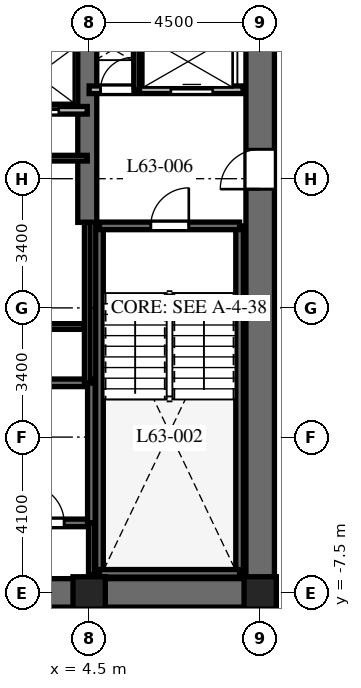
"""IFC4 building model, lengths in metres.
Left out: names, types, materials, properties, quantities, classifications, styles, units other than length and angle.
Written with IfcOpenShell. Run it as: python <this file> out.ifc"""

import sys

from ifc_helpers import new_model, si_unit, direction, frame, frame_2d, origin, origin_2d, place, context, subcontext, project, spatial, rectangle, extrude, element, fill, save


model = new_model("IFC4")
c1 = context("Model", 3, precision=1e-05, world=origin(), true_north=direction((0.0, 1.0)))
c2 = subcontext(c1, "Body", "Model", "MODEL_VIEW")
j1 = project(units=[si_unit("LENGTHUNIT", "METRE"), si_unit("PLANEANGLEUNIT", "RADIAN")], contexts=[c1])
p1 = place(None, origin())
s1 = spatial("IfcSite", under=j1, at=p1, CompositionType="ELEMENT")
p2 = place(p1, origin())
s2 = spatial("IfcBuilding", under=s1, at=p2, CompositionType="ELEMENT")
p3 = place(p2, frame((0.0, 0.0, 252.1)))
s3 = spatial("IfcBuildingStorey", under=s2, at=p3, CompositionType="ELEMENT", Elevation=252.1)
p4 = place(p3, frame((-9.375, -7.5, 0.0), z_axis=(0.0, 0.0, 1.0), x_axis=(1.0, 0.0, 0.0)))
e1 = element("IfcWall", 1, at=p4, inside=s3, PredefinedType="SHEAR", context=c2, shape_type="SweptSolid", body=[
    extrude(rectangle(XDim=18.75, YDim=0.75, at=frame_2d((9.375, 0.0))), origin(), (0.0, 0.0, 1.0), 3.8),
])
p5 = place(p4, frame((9.425, 0.0, 0.0)))
e2 = element("IfcOpeningElement", 2, at=p5, cuts=e1, PredefinedType="OPENING", context=c2, shape_type="SweptSolid", body=[
    extrude(rectangle(XDim=1.0, YDim=2.15, at=frame_2d((0.5, 1.075))), frame((0.0, 0.385, 0.0), z_axis=(0.0, -1.0, 0.0), x_axis=(1.0, 0.0, 0.0)), (0.0, 0.0, 1.0), 0.77),
])
p6 = place(p3, frame((9.0, -7.125, 0.0), z_axis=(0.0, 0.0, 1.0), x_axis=(0.0, 1.0, 0.0)))
e3 = element("IfcWall", 3, at=p6, inside=s3, PredefinedType="SHEAR", context=c2, shape_type="SweptSolid", body=[
    extrude(rectangle(XDim=14.25, YDim=0.75, at=frame_2d((7.125, 0.0))), origin(), (0.0, 0.0, 1.0), 3.8),
])
p7 = place(p6, frame((10.25, 0.0, 0.0)))
e4 = element("IfcOpeningElement", 4, at=p7, cuts=e3, PredefinedType="OPENING", context=c2, shape_type="SweptSolid", body=[
    extrude(rectangle(XDim=1.05, YDim=2.15, at=frame_2d((0.525, 1.075))), frame((0.0, 0.385, 0.0), z_axis=(0.0, -1.0, 0.0), x_axis=(1.0, 0.0, 0.0)), (0.0, 0.0, 1.0), 0.77),
])
p8 = place(p3, frame((4.45, 2.25, 0.0), z_axis=(0.0, 0.0, 1.0), x_axis=(0.0, 1.0, 0.0)))
e5 = element("IfcWall", 5, at=p8, inside=s3, PredefinedType="SHEAR", context=c2, shape_type="SweptSolid", body=[
    extrude(rectangle(XDim=4.875, YDim=0.5, at=frame_2d((2.438, 0.0))), origin(), (0.0, 0.0, 1.0), 3.8),
])
for number, where, z_axis, x_axis in (
    (6, (4.772, -6.985, 0.0), (0.0, 0.0, 1.0), (0.0, 1.0, 0.0)),
    (7, (8.458, -6.985, 0.0), (0.0, 0.0, 1.0), (0.0, 1.0, 0.0)),
):
    element("IfcWall", number, at=place(p3, frame(where, z_axis=z_axis, x_axis=x_axis)), inside=s3, PredefinedType="SHEAR", context=c2, shape_type="SweptSolid", body=[
        extrude(rectangle(XDim=9.143, YDim=0.2, at=frame_2d((4.572, 0.0))), origin(), (0.0, 0.0, 1.0), 3.8),
    ])
p9 = place(p3, frame((4.772, -6.985, 0.0), z_axis=(0.0, 0.0, 1.0), x_axis=(1.0, 0.0, 0.0)))
e8 = element("IfcWall", 8, at=p9, inside=s3, PredefinedType="SHEAR", context=c2, shape_type="SweptSolid", body=[
    extrude(rectangle(XDim=3.686, YDim=0.2, at=frame_2d((1.843, 0.0))), origin(), (0.0, 0.0, 1.0), 3.8),
])
p10 = place(p3, frame((4.772, 2.158, 0.0), z_axis=(0.0, 0.0, 1.0), x_axis=(1.0, 0.0, 0.0)))
e9 = element("IfcWall", 9, at=p10, inside=s3, PredefinedType="SHEAR", context=c2, shape_type="SweptSolid", body=[
    extrude(rectangle(XDim=3.686, YDim=0.2, at=frame_2d((1.843, 0.0))), origin(), (0.0, 0.0, 1.0), 3.8),
])
p11 = place(p10, frame((1.35, 0.0, 0.0)))
e10 = element("IfcOpeningElement", 10, at=p11, cuts=e9, PredefinedType="OPENING", context=c2, shape_type="SweptSolid", body=[
    extrude(rectangle(XDim=1.0, YDim=2.15, at=frame_2d((0.5, 1.075))), frame((0.0, 0.11, 0.0), z_axis=(0.0, -1.0, 0.0), x_axis=(1.0, 0.0, 0.0)), (0.0, 0.0, 1.0), 0.22),
])
p12 = place(p3, frame((-4.608, -5.658, 0.0), z_axis=(0.0, 0.0, 1.0), x_axis=(1.0, 0.0, 0.0)))
e11 = element("IfcWall", 11, at=p12, inside=s3, PredefinedType="SHEAR", context=c2, shape_type="SweptSolid", body=[
    extrude(rectangle(XDim=9.166, YDim=0.2, at=frame_2d((4.583, 0.0))), origin(), (0.0, 0.0, 1.0), 3.8),
])
p13 = place(p12, frame((7.45, 0.0, 0.0)))
e12 = element("IfcOpeningElement", 12, at=p13, cuts=e11, PredefinedType="OPENING", context=c2, shape_type="SweptSolid", body=[
    extrude(rectangle(XDim=1.0, YDim=2.15, at=frame_2d((0.5, 1.075))), frame((0.0, 0.11, 0.0), z_axis=(0.0, -1.0, 0.0), x_axis=(1.0, 0.0, 0.0)), (0.0, 0.0, 1.0), 0.22),
])
p14 = place(p3, frame((-4.608, -1.972, 0.0), z_axis=(0.0, 0.0, 1.0), x_axis=(1.0, 0.0, 0.0)))
e13 = element("IfcWall", 13, at=p14, inside=s3, PredefinedType="SHEAR", context=c2, shape_type="SweptSolid", body=[
    extrude(rectangle(XDim=9.166, YDim=0.2, at=frame_2d((4.583, 0.0))), origin(), (0.0, 0.0, 1.0), 3.8),
])
p15 = place(p3, frame((4.558, -5.658, 0.0), z_axis=(0.0, 0.0, 1.0), x_axis=(0.0, 1.0, 0.0)))
e14 = element("IfcWall", 14, at=p15, inside=s3, PredefinedType="SHEAR", context=c2, shape_type="SweptSolid", body=[
    extrude(rectangle(XDim=3.686, YDim=0.2, at=frame_2d((1.843, 0.0))), origin(), (0.0, 0.0, 1.0), 3.8),
])
for number, where, z_axis, x_axis in (
    (15, (4.5, -7.5, 0.0), (0.0, 0.0, 1.0), (1.0, 0.0, 0.0)),
    (16, (9.0, -7.5, 0.0), (0.0, 0.0, 1.0), (1.0, 0.0, 0.0)),
):
    element("IfcColumn", number, at=place(p3, frame(where, z_axis=z_axis, x_axis=x_axis)), inside=s3, PredefinedType="COLUMN", context=c2, shape_type="SweptSolid", body=[
        extrude(rectangle(XDim=0.85, YDim=0.85, at=origin_2d()), origin(), (0.0, 0.0, 1.0), 3.8),
    ])
p16 = place(p3, frame((4.558, -7.02, 0.0), z_axis=(0.0, 0.0, 1.0), x_axis=(0.0, 1.0, 0.0)))
e17 = element("IfcWall", 17, at=p16, inside=s3, PredefinedType="PARTITIONING", context=c2, shape_type="SweptSolid", body=[
    extrude(rectangle(XDim=1.362, YDim=0.15, at=frame_2d((0.681, 0.0))), origin(), (0.0, 0.0, 1.0), 3.48),
])
p17 = place(p3, frame((4.5, 5.74, 0.0), z_axis=(0.0, 0.0, 1.0), x_axis=(1.0, 0.0, 0.0)))
e18 = element("IfcWall", 18, at=p17, inside=s3, PredefinedType="PARTITIONING", context=c2, shape_type="SweptSolid", body=[
    extrude(rectangle(XDim=4.05, YDim=0.2, at=frame_2d((2.025, 0.0))), origin(), (0.0, 0.0, 1.0), 3.48),
])
p18 = place(p17, frame((0.3, 0.0, 0.0)))
e19 = element("IfcOpeningElement", 19, at=p18, cuts=e18, PredefinedType="OPENING", context=c2, shape_type="SweptSolid", body=[
    extrude(rectangle(XDim=0.85, YDim=2.03, at=frame_2d((0.425, 1.015))), frame((0.0, 0.11, 0.0), z_axis=(0.0, -1.0, 0.0), x_axis=(1.0, 0.0, 0.0)), (0.0, 0.0, 1.0), 0.22),
])
p19 = place(p17, frame((2.15, 0.0, 0.0)))
e20 = element("IfcOpeningElement", 20, at=p19, cuts=e18, PredefinedType="OPENING", context=c2, shape_type="SweptSolid", body=[
    extrude(rectangle(XDim=1.1, YDim=2.2, at=frame_2d((0.55, 1.1))), frame((0.0, 0.11, 0.0), z_axis=(0.0, -1.0, 0.0), x_axis=(1.0, 0.0, 0.0)), (0.0, 0.0, 1.0), 0.22),
])
p20 = place(p3, frame((5.75, 5.74, 0.0), z_axis=(0.0, 0.0, 1.0), x_axis=(0.0, 1.0, 0.0)))
e21 = element("IfcWall", 21, at=p20, inside=s3, PredefinedType="PARTITIONING", context=c2, shape_type="SweptSolid", body=[
    extrude(rectangle(XDim=1.41, YDim=0.15, at=frame_2d((0.705, 0.0))), origin(), (0.0, 0.0, 1.0), 3.48),
])
p21 = place(p3, frame((1.85, 5.2, 0.0), z_axis=(0.0, 0.0, 1.0), x_axis=(1.0, 0.0, 0.0)))
e22 = element("IfcWall", 22, at=p21, inside=s3, PredefinedType="PARTITIONING", context=c2, shape_type="SweptSolid", body=[
    extrude(rectangle(XDim=2.6, YDim=0.2, at=frame_2d((1.3, 0.0))), origin(), (0.0, 0.0, 1.0), 3.48),
])
p22 = place(p21, frame((0.75, 0.0, 0.0)))
e23 = element("IfcOpeningElement", 23, at=p22, cuts=e22, PredefinedType="OPENING", context=c2, shape_type="SweptSolid", body=[
    extrude(rectangle(XDim=1.1, YDim=2.2, at=frame_2d((0.55, 1.1))), frame((0.0, 0.11, 0.0), z_axis=(0.0, -1.0, 0.0), x_axis=(1.0, 0.0, 0.0)), (0.0, 0.0, 1.0), 0.22),
])
p23 = place(p3, frame((4.45, -1.972, 0.0), z_axis=(0.0, 0.0, 1.0), x_axis=(0.0, 1.0, 0.0)))
e24 = element("IfcWall", 24, at=p23, inside=s3, PredefinedType="PARTITIONING", context=c2, shape_type="SweptSolid", body=[
    extrude(rectangle(XDim=4.222, YDim=0.15, at=frame_2d((2.111, 0.0))), origin(), (0.0, 0.0, 1.0), 3.48),
])
p24 = place(p3, frame((1.9, 3.94, 0.0), z_axis=(0.0, 0.0, 1.0), x_axis=(1.0, 0.0, 0.0)))
e25 = element("IfcWall", 25, at=p24, inside=s3, PredefinedType="PARTITIONING", context=c2, shape_type="SweptSolid", body=[
    extrude(rectangle(XDim=2.55, YDim=0.15, at=frame_2d((1.275, 0.0))), origin(), (0.0, 0.0, 1.0), 3.48),
])
p25 = place(p3, frame((-4.36, -0.49, 0.0), z_axis=(0.0, 0.0, 1.0), x_axis=(1.0, 0.0, 0.0)))
e26 = element("IfcWall", 26, at=p25, inside=s3, PredefinedType="PARTITIONING", context=c2, shape_type="SweptSolid", body=[
    extrude(rectangle(XDim=8.72, YDim=0.15, at=frame_2d((4.36, 0.0))), origin(), (0.0, 0.0, 1.0), 3.48),
])
p26 = place(p25, frame((3.16, 0.0, 0.0)))
e27 = element("IfcOpeningElement", 27, at=p26, cuts=e26, PredefinedType="OPENING", context=c2, shape_type="SweptSolid", body=[
    extrude(rectangle(XDim=0.85, YDim=2.03, at=frame_2d((0.425, 1.015))), frame((0.0, 0.085, 0.0), z_axis=(0.0, -1.0, 0.0), x_axis=(1.0, 0.0, 0.0)), (0.0, 0.0, 1.0), 0.17),
])
p27 = place(p25, frame((5.21, 0.0, 0.0)))
e28 = element("IfcOpeningElement", 28, at=p27, cuts=e26, PredefinedType="OPENING", context=c2, shape_type="SweptSolid", body=[
    extrude(rectangle(XDim=0.85, YDim=2.03, at=frame_2d((0.425, 1.015))), frame((0.0, 0.085, 0.0), z_axis=(0.0, -1.0, 0.0), x_axis=(1.0, 0.0, 0.0)), (0.0, 0.0, 1.0), 0.17),
])
p28 = place(p11, origin())
e29 = element("IfcDoor", 29, at=p28, inside=s3, OperationType="SINGLE_SWING_RIGHT", PredefinedType="DOOR", context=c2, shape_type="SweptSolid", body=[
    extrude(rectangle(XDim=1.0, YDim=2.15, at=frame_2d((0.5, 1.075))), frame((0.0, 0.025, 0.0), z_axis=(0.0, -1.0, 0.0), x_axis=(1.0, 0.0, 0.0)), (0.0, 0.0, 1.0), 0.05),
])
fill(e10, e29)
p29 = place(p13, origin())
e30 = element("IfcDoor", 30, at=p29, inside=s3, OperationType="SINGLE_SWING_LEFT", PredefinedType="DOOR", context=c2, shape_type="SweptSolid", body=[
    extrude(rectangle(XDim=1.0, YDim=2.15, at=frame_2d((0.5, 1.075))), frame((0.0, 0.025, 0.0), z_axis=(0.0, -1.0, 0.0), x_axis=(1.0, 0.0, 0.0)), (0.0, 0.0, 1.0), 0.05),
])
fill(e12, e30)
p30 = place(p7, origin())
e31 = element("IfcDoor", 31, at=p30, inside=s3, OperationType="SINGLE_SWING_LEFT", PredefinedType="DOOR", context=c2, shape_type="SweptSolid", body=[
    extrude(rectangle(XDim=1.05, YDim=2.15, at=frame_2d((0.525, 1.075))), frame((0.0, 0.025, 0.0), z_axis=(0.0, -1.0, 0.0), x_axis=(1.0, 0.0, 0.0)), (0.0, 0.0, 1.0), 0.05),
])
fill(e4, e31)
p31 = place(p18, origin())
e32 = element("IfcDoor", 32, at=p31, inside=s3, OperationType="SINGLE_SWING_RIGHT", PredefinedType="DOOR", context=c2, shape_type="SweptSolid", body=[
    extrude(rectangle(XDim=0.85, YDim=2.03, at=frame_2d((0.425, 1.015))), frame((0.0, 0.025, 0.0), z_axis=(0.0, -1.0, 0.0), x_axis=(1.0, 0.0, 0.0)), (0.0, 0.0, 1.0), 0.05),
])
fill(e19, e32)
p32 = place(p19, origin())
e33 = element("IfcDoor", 33, at=p32, inside=s3, OperationType="SLIDING_TO_RIGHT", PredefinedType="DOOR", context=c2, shape_type="SweptSolid", body=[
    extrude(rectangle(XDim=1.1, YDim=2.2, at=frame_2d((0.55, 1.1))), frame((0.0, 0.025, 0.0), z_axis=(0.0, -1.0, 0.0), x_axis=(1.0, 0.0, 0.0)), (0.0, 0.0, 1.0), 0.05),
])
fill(e20, e33)
p33 = place(p22, origin())
e34 = element("IfcDoor", 34, at=p33, inside=s3, OperationType="SLIDING_TO_RIGHT", PredefinedType="DOOR", context=c2, shape_type="SweptSolid", body=[
    extrude(rectangle(XDim=1.1, YDim=2.2, at=frame_2d((0.55, 1.1))), frame((0.0, 0.025, 0.0), z_axis=(0.0, -1.0, 0.0), x_axis=(1.0, 0.0, 0.0)), (0.0, 0.0, 1.0), 0.05),
])
fill(e23, e34)
save(model, sys.argv[1])
